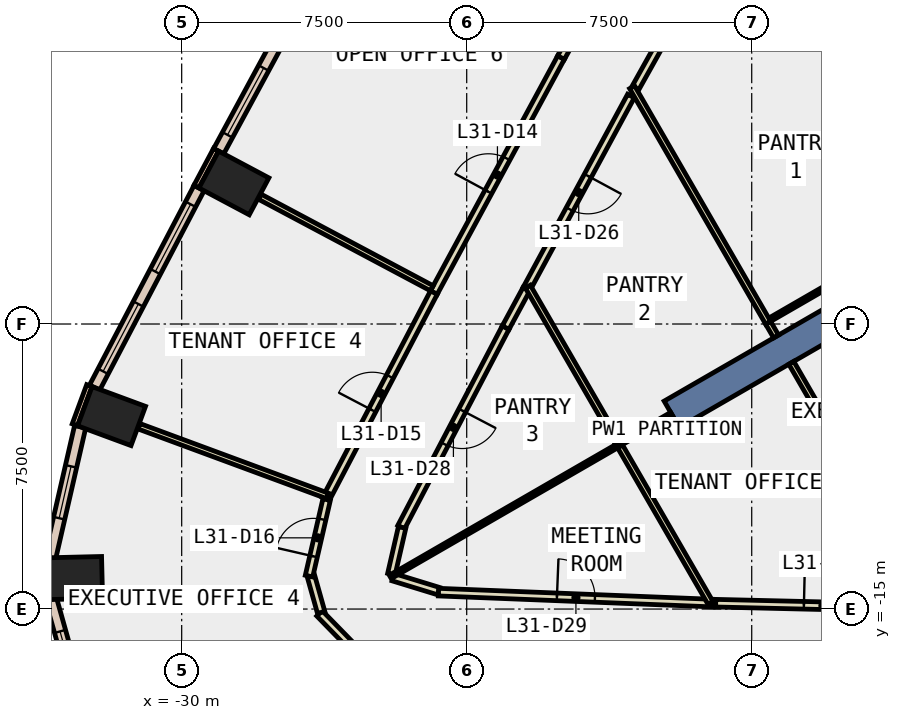
"""IFC4 building model, lengths in metres.
Left out: names, types, materials, properties, quantities, classifications, styles, units other than length and angle.
Written with IfcOpenShell. Run it as: python <this file> out.ifc"""

import sys

from ifc_helpers import new_model, si_unit, direction, frame, frame_2d, origin, origin_2d, place, context, subcontext, project, spatial, polyline, rectangle, outline, extrude, element, fill, save


model = new_model("IFC4")
c1 = context("Model", 3, precision=1e-05, world=origin(), true_north=direction((0.0, 1.0)))
c2 = subcontext(c1, "Body", "Model", "MODEL_VIEW")
j1 = project(units=[si_unit("LENGTHUNIT", "METRE"), si_unit("PLANEANGLEUNIT", "RADIAN")], contexts=[c1])
p1 = place(None, origin())
s1 = spatial("IfcSite", under=j1, at=p1, CompositionType="ELEMENT")
p2 = place(p1, origin())
s2 = spatial("IfcBuilding", under=s1, at=p2, CompositionType="ELEMENT")
p3 = place(p2, frame((0.0, 0.0, 142.4)))
s3 = spatial("IfcBuildingStorey", under=s2, at=p3, CompositionType="ELEMENT", Elevation=142.4)
for number, where, z_axis, x_axis in (
    (1, (-28.626, -3.788, -0.4), (0.0, 0.0, 1.0), (0.47, 0.883, 0.0)),
    (2, (-31.846, -9.923, -0.4), (0.0, 0.0, 1.0), (0.347, 0.938, 0.0)),
    (3, (-32.845, -14.185, -0.4), (0.0, 0.0, 1.0), (-0.024, 1.0, 0.0)),
):
    element("IfcColumn", number, at=place(p3, frame(where, z_axis=z_axis, x_axis=x_axis)), inside=s3, PredefinedType="COLUMN", context=c2, shape_type="SweptSolid", body=[
        extrude(rectangle(XDim=1.1, YDim=1.5, at=origin_2d()), origin(), (0.0, 0.0, 1.0), 4.2),
    ])
p4 = place(p3, frame((0.0, 0.0, -0.4)))
e4 = element("IfcWall", 4, at=p4, inside=s3, PredefinedType="SHEAR", context=c2, shape_type="SweptSolid", body=[
    extrude(outline(polyline([(-13.856, 2.5), (-6.928, -9.5), (-6.466, -8.7), (-12.933, 2.5), (-13.856, 2.5)])), origin(), (0.0, 0.0, 1.0), 4.2),
])
p5 = place(p3, frame((-9.31, -5.375, -0.4), z_axis=(0.0, 0.0, 1.0), x_axis=(-0.866017533419, -0.500013631625, 0.0)))
e5 = element("IfcWall", 5, at=p5, inside=s3, PredefinedType="SHEAR", context=c2, shape_type="SweptSolid", body=[
    extrude(rectangle(XDim=9.0, YDim=0.8, at=frame_2d((4.5, 0.0))), origin(), (0.0, 0.0, 1.0), 4.2),
])
for number, where, z_axis, x_axis in (
    (6, (-29.095, -2.915, 0.0), (0.0, 0.0, 1.0), (-0.47, -0.883, 0.0)),
    (7, (-32.429, -9.121, 0.0), (0.0, 0.0, 1.0), (-0.346, -0.938, 0.0)),
):
    element("IfcWall", number, at=place(p3, frame(where, z_axis=z_axis, x_axis=x_axis)), inside=s3, PredefinedType="STANDARD", context=c2, shape_type="SweptSolid", body=[
        extrude(rectangle(XDim=1.1, YDim=0.15, at=frame_2d((0.55, 0.0))), origin(), (0.0, 0.0, 1.0), 3.8),
    ])
p6 = place(p3, frame((-26.194, 2.282, 0.0), z_axis=(0.0, 0.0, 1.0), x_axis=(-0.475794135288, -0.87955667289, 0.0)))
e8 = element("IfcWall", 8, at=p6, inside=s3, PredefinedType="STANDARD", context=c2, shape_type="SweptSolid", body=[
    extrude(rectangle(XDim=5.952, YDim=0.3, at=frame_2d((2.976, 0.0))), origin(), (0.0, 0.0, 1.0), 3.8),
])
p7 = place(p6, frame((0.488, 0.0, 0.9)))
e9 = element("IfcOpeningElement", 9, at=p7, cuts=e8, PredefinedType="OPENING", context=c2, shape_type="SweptSolid", body=[
    extrude(rectangle(XDim=2.0, YDim=2.6, at=frame_2d((1.0, 1.3))), frame((0.0, 0.16, 0.0), z_axis=(0.0, -1.0, 0.0), x_axis=(1.0, 0.0, 0.0)), (0.0, 0.0, 1.0), 0.32),
])
p8 = place(p6, frame((3.464, 0.0, 0.9)))
e10 = element("IfcOpeningElement", 10, at=p8, cuts=e8, PredefinedType="OPENING", context=c2, shape_type="SweptSolid", body=[
    extrude(rectangle(XDim=2.0, YDim=2.6, at=frame_2d((1.0, 1.3))), frame((0.0, 0.16, 0.0), z_axis=(0.0, -1.0, 0.0), x_axis=(1.0, 0.0, 0.0)), (0.0, 0.0, 1.0), 0.32),
])
p9 = place(p3, frame((-29.542, -3.922, 0.0), z_axis=(0.0, 0.0, 1.0), x_axis=(-0.463809970306, -0.885934710599, 0.0)))
e11 = element("IfcWall", 11, at=p9, inside=s3, PredefinedType="STANDARD", context=c2, shape_type="SweptSolid", body=[
    extrude(rectangle(XDim=5.927, YDim=0.3, at=frame_2d((2.963, 0.0))), origin(), (0.0, 0.0, 1.0), 3.8),
])
p10 = place(p9, frame((0.482, 0.0, 0.9)))
e12 = element("IfcOpeningElement", 12, at=p10, cuts=e11, PredefinedType="OPENING", context=c2, shape_type="SweptSolid", body=[
    extrude(rectangle(XDim=2.0, YDim=2.6, at=frame_2d((1.0, 1.3))), frame((0.0, 0.16, 0.0), z_axis=(0.0, -1.0, 0.0), x_axis=(1.0, 0.0, 0.0)), (0.0, 0.0, 1.0), 0.32),
])
p11 = place(p9, frame((3.445, 0.0, 0.9)))
e13 = element("IfcOpeningElement", 13, at=p11, cuts=e11, PredefinedType="OPENING", context=c2, shape_type="SweptSolid", body=[
    extrude(rectangle(XDim=2.0, YDim=2.6, at=frame_2d((1.0, 1.3))), frame((0.0, 0.16, 0.0), z_axis=(0.0, -1.0, 0.0), x_axis=(1.0, 0.0, 0.0)), (0.0, 0.0, 1.0), 0.32),
])
p12 = place(p3, frame((-32.672, -10.203, 0.0), z_axis=(0.0, 0.0, 1.0), x_axis=(-0.223538714932, -0.974695051247, 0.0)))
e14 = element("IfcWall", 14, at=p12, inside=s3, PredefinedType="STANDARD", context=c2, shape_type="SweptSolid", body=[
    extrude(rectangle(XDim=3.538, YDim=0.3, at=frame_2d((1.769, 0.0))), origin(), (0.0, 0.0, 1.0), 3.8),
])
p13 = place(p12, frame((1.069, 0.0, 0.9)))
e15 = element("IfcOpeningElement", 15, at=p13, cuts=e14, PredefinedType="OPENING", context=c2, shape_type="SweptSolid", body=[
    extrude(rectangle(XDim=1.4, YDim=2.6, at=frame_2d((0.7, 1.3))), frame((0.0, 0.16, 0.0), z_axis=(0.0, -1.0, 0.0), x_axis=(1.0, 0.0, 0.0)), (0.0, 0.0, 1.0), 0.32),
])
p14 = place(p3, frame((-33.437, -14.749, 0.0), z_axis=(0.0, 0.0, 1.0), x_axis=(0.270471130801, -0.962728085912, 0.0)))
e16 = element("IfcWall", 16, at=p14, inside=s3, PredefinedType="STANDARD", context=c2, shape_type="SweptSolid", body=[
    extrude(rectangle(XDim=3.143, YDim=0.3, at=frame_2d((1.572, 0.0))), origin(), (0.0, 0.0, 1.0), 3.8),
])
p15 = place(p14, frame((0.872, 0.0, 0.9)))
e17 = element("IfcOpeningElement", 17, at=p15, cuts=e16, PredefinedType="OPENING", context=c2, shape_type="SweptSolid", body=[
    extrude(rectangle(XDim=1.4, YDim=2.6, at=frame_2d((0.7, 1.3))), frame((0.0, 0.16, 0.0), z_axis=(0.0, -1.0, 0.0), x_axis=(1.0, 0.0, 0.0)), (0.0, 0.0, 1.0), 0.32),
])
p16 = place(p3, frame((-14.955, 4.264, 0.0), z_axis=(0.0, 0.0, 1.0), x_axis=(-0.4879770011, -0.872856486713, 0.0)))
e18 = element("IfcWall", 18, at=p16, inside=s3, PredefinedType="PARTITIONING", context=c2, shape_type="SweptSolid", body=[
    extrude(rectangle(XDim=6.363, YDim=0.2, at=frame_2d((3.182, 0.0))), origin(), (0.0, 0.0, 1.0), 3.8),
])
p17 = place(p16, frame((2.681, 0.0, 0.0)))
e19 = element("IfcOpeningElement", 19, at=p17, cuts=e18, PredefinedType="OPENING", context=c2, shape_type="SweptSolid", body=[
    extrude(rectangle(XDim=1.0, YDim=2.1, at=frame_2d((0.5, 1.05))), frame((0.0, 0.11, 0.0), z_axis=(0.0, -1.0, 0.0), x_axis=(1.0, 0.0, 0.0)), (0.0, 0.0, 1.0), 0.22),
])
p18 = place(p3, frame((-18.178, -1.501, 0.0), z_axis=(0.0, 0.0, 1.0), x_axis=(-0.475923642768, -0.879486603795, 0.0)))
e20 = element("IfcWall", 20, at=p18, inside=s3, PredefinedType="PARTITIONING", context=c2, shape_type="SweptSolid", body=[
    extrude(rectangle(XDim=5.776, YDim=0.2, at=frame_2d((2.888, 0.0))), origin(), (0.0, 0.0, 1.0), 3.8),
])
p19 = place(p18, frame((2.388, 0.0, 0.0)))
e21 = element("IfcOpeningElement", 21, at=p19, cuts=e20, PredefinedType="OPENING", context=c2, shape_type="SweptSolid", body=[
    extrude(rectangle(XDim=1.0, YDim=2.1, at=frame_2d((0.5, 1.05))), frame((0.0, 0.11, 0.0), z_axis=(0.0, -1.0, 0.0), x_axis=(1.0, 0.0, 0.0)), (0.0, 0.0, 1.0), 0.22),
])
p20 = place(p3, frame((-15.948, -14.846, 0.0), z_axis=(0.0, 0.0, 1.0), x_axis=(0.999722136341, -0.023572231734, 0.0)))
e22 = element("IfcWall", 22, at=p20, inside=s3, PredefinedType="PARTITIONING", context=c2, shape_type="SweptSolid", body=[
    extrude(rectangle(XDim=5.645, YDim=0.2, at=frame_2d((2.822, 0.0))), origin(), (0.0, 0.0, 1.0), 3.8),
])
p21 = place(p20, frame((2.322, 0.0, 0.0)))
e23 = element("IfcOpeningElement", 23, at=p21, cuts=e22, PredefinedType="OPENING", context=c2, shape_type="SweptSolid", body=[
    extrude(rectangle(XDim=1.0, YDim=2.1, at=frame_2d((0.5, 1.05))), frame((0.0, 0.11, 0.0), z_axis=(0.0, -1.0, 0.0), x_axis=(1.0, 0.0, 0.0)), (0.0, 0.0, 1.0), 0.22),
])
p22 = place(p3, frame((-21.475, -7.594, 0.0), z_axis=(0.0, 0.0, 1.0), x_axis=(-0.463809970306, -0.885934710599, 0.0)))
e24 = element("IfcWall", 24, at=p22, inside=s3, PredefinedType="PARTITIONING", context=c2, shape_type="SweptSolid", body=[
    extrude(rectangle(XDim=5.927, YDim=0.2, at=frame_2d((2.963, 0.0))), origin(), (0.0, 0.0, 1.0), 3.8),
])
p23 = place(p22, frame((2.464, 0.0, 0.0)))
e25 = element("IfcOpeningElement", 25, at=p23, cuts=e24, PredefinedType="OPENING", context=c2, shape_type="SweptSolid", body=[
    extrude(rectangle(XDim=1.0, YDim=2.1, at=frame_2d((0.5, 1.05))), frame((0.0, 0.11, 0.0), z_axis=(0.0, -1.0, 0.0), x_axis=(1.0, 0.0, 0.0)), (0.0, 0.0, 1.0), 0.22),
])
p24 = place(p3, frame((-24.2, -12.854, 0.0), z_axis=(0.0, 0.0, 1.0), x_axis=(-0.223967203961, -0.974596681479, 0.0)))
e26 = element("IfcWall", 26, at=p24, inside=s3, PredefinedType="PARTITIONING", context=c2, shape_type="SweptSolid", body=[
    extrude(rectangle(XDim=1.259, YDim=0.2, at=frame_2d((0.629, 0.0))), origin(), (0.0, 0.0, 1.0), 3.8),
])
p25 = place(p3, frame((-20.927, -6.581, 0.0), z_axis=(0.0, 0.0, 1.0), x_axis=(-0.475893856394, -0.879502721682, 0.0)))
e27 = element("IfcWall", 27, at=p25, inside=s3, PredefinedType="PARTITIONING", context=c2, shape_type="SweptSolid", body=[
    extrude(rectangle(XDim=1.152, YDim=0.2, at=frame_2d((0.576, 0.0))), origin(), (0.0, 0.0, 1.0), 3.8),
])
p26 = place(p3, frame((-24.435, -14.162, 0.0), z_axis=(0.0, 0.0, 1.0), x_axis=(0.956086269468, -0.293085389152, 0.0)))
e28 = element("IfcWall", 28, at=p26, inside=s3, PredefinedType="PARTITIONING", context=c2, shape_type="SweptSolid", body=[
    extrude(rectangle(XDim=1.252, YDim=0.2, at=frame_2d((0.626, 0.0))), origin(), (0.0, 0.0, 1.0), 3.8),
])
p27 = place(p3, frame((-23.242, -14.555, 0.0), z_axis=(0.0, 0.0, 1.0), x_axis=(0.999202143743, -0.039938401802, 0.0)))
e29 = element("IfcWall", 29, at=p27, inside=s3, PredefinedType="PARTITIONING", context=c2, shape_type="SweptSolid", body=[
    extrude(rectangle(XDim=7.238, YDim=0.2, at=frame_2d((3.619, 0.0))), origin(), (0.0, 0.0, 1.0), 3.8),
])
p28 = place(p27, frame((3.119, 0.0, 0.0)))
e30 = element("IfcOpeningElement", 30, at=p28, cuts=e29, PredefinedType="OPENING", context=c2, shape_type="SweptSolid", body=[
    extrude(rectangle(XDim=1.0, YDim=2.1, at=frame_2d((0.5, 1.05))), frame((0.0, 0.11, 0.0), z_axis=(0.0, -1.0, 0.0), x_axis=(1.0, 0.0, 0.0)), (0.0, 0.0, 1.0), 0.22),
])
p29 = place(p3, frame((-23.365, -6.673, 0.0), z_axis=(0.0, 0.0, 1.0), x_axis=(0.47597665142, 0.879457916732, 0.0)))
e31 = element("IfcWall", 31, at=p29, inside=s3, PredefinedType="PARTITIONING", context=c2, shape_type="SweptSolid", body=[
    extrude(rectangle(XDim=7.032, YDim=0.2, at=frame_2d((3.516, 0.0))), origin(), (0.0, 0.0, 1.0), 3.8),
])
p30 = place(p29, frame((3.016, 0.0, 0.0)))
e32 = element("IfcOpeningElement", 32, at=p30, cuts=e31, PredefinedType="OPENING", context=c2, shape_type="SweptSolid", body=[
    extrude(rectangle(XDim=1.0, YDim=2.1, at=frame_2d((0.5, 1.05))), frame((0.0, 0.11, 0.0), z_axis=(0.0, -1.0, 0.0), x_axis=(1.0, 0.0, 0.0)), (0.0, 0.0, 1.0), 0.22),
])
p31 = place(p3, frame((-20.018, -0.489, 0.0), z_axis=(0.0, 0.0, 1.0), x_axis=(0.48792588674, 0.872885060617, 0.0)))
e33 = element("IfcWall", 33, at=p31, inside=s3, PredefinedType="PARTITIONING", context=c2, shape_type="SweptSolid", body=[
    extrude(rectangle(XDim=3.403, YDim=0.2, at=frame_2d((1.701, 0.0))), origin(), (0.0, 0.0, 1.0), 3.8),
])
p32 = place(p3, frame((-26.21, -12.111, 0.0), z_axis=(0.0, 0.0, 1.0), x_axis=(0.46374980173, 0.885966207818, 0.0)))
e34 = element("IfcWall", 34, at=p32, inside=s3, PredefinedType="PARTITIONING", context=c2, shape_type="SweptSolid", body=[
    extrude(rectangle(XDim=6.137, YDim=0.2, at=frame_2d((3.068, 0.0))), origin(), (0.0, 0.0, 1.0), 3.8),
])
p33 = place(p32, frame((2.644, 0.0, 0.0)))
e35 = element("IfcOpeningElement", 35, at=p33, cuts=e34, PredefinedType="OPENING", context=c2, shape_type="SweptSolid", body=[
    extrude(rectangle(XDim=1.0, YDim=2.1, at=frame_2d((0.5, 1.05))), frame((0.0, 0.11, 0.0), z_axis=(0.0, -1.0, 0.0), x_axis=(1.0, 0.0, 0.0)), (0.0, 0.0, 1.0), 0.22),
])
p34 = place(p3, frame((-25.538, -15.97, 0.0), z_axis=(0.0, 0.0, 1.0), x_axis=(-0.698272822523, 0.715831729756, 0.0)))
e36 = element("IfcWall", 36, at=p34, inside=s3, PredefinedType="PARTITIONING", context=c2, shape_type="SweptSolid", body=[
    extrude(rectangle(XDim=1.196, YDim=0.2, at=frame_2d((0.598, 0.0))), origin(), (0.0, 0.0, 1.0), 3.8),
])
p35 = place(p3, frame((-26.33, -15.089, 0.0), z_axis=(0.0, 0.0, 1.0), x_axis=(-0.270631784819, 0.962682936925, 0.0)))
e37 = element("IfcWall", 37, at=p35, inside=s3, PredefinedType="PARTITIONING", context=c2, shape_type="SweptSolid", body=[
    extrude(rectangle(XDim=0.994, YDim=0.2, at=frame_2d((0.497, 0.0))), origin(), (0.0, 0.0, 1.0), 3.8),
])
p36 = place(p3, frame((-26.649, -14.133, 0.0), z_axis=(0.0, 0.0, 1.0), x_axis=(0.224108401048, 0.974564222912, 0.0)))
e38 = element("IfcWall", 38, at=p36, inside=s3, PredefinedType="PARTITIONING", context=c2, shape_type="SweptSolid", body=[
    extrude(rectangle(XDim=2.065, YDim=0.2, at=frame_2d((1.033, 0.0))), origin(), (0.0, 0.0, 1.0), 3.8),
])
p37 = place(p36, frame((0.533, 0.0, 0.0)))
e39 = element("IfcOpeningElement", 39, at=p37, cuts=e38, PredefinedType="OPENING", context=c2, shape_type="SweptSolid", body=[
    extrude(rectangle(XDim=1.0, YDim=2.1, at=frame_2d((0.5, 1.05))), frame((0.0, 0.11, 0.0), z_axis=(0.0, -1.0, 0.0), x_axis=(1.0, 0.0, 0.0)), (0.0, 0.0, 1.0), 0.22),
])
p38 = place(p3, frame((-10.305, -4.951, 0.0), z_axis=(0.0, 0.0, 1.0), x_axis=(-0.866031185235, -0.4999899861, 0.0)))
e40 = element("IfcWall", 40, at=p38, inside=s3, PredefinedType="PARTITIONING", context=c2, shape_type="SweptSolid", body=[
    extrude(rectangle(XDim=4.95, YDim=0.1, at=frame_2d((2.475, 0.0))), origin(), (0.0, 0.0, 1.0), 3.8),
])
p39 = place(p3, frame((-14.567, -7.469, 0.0), z_axis=(0.0, 0.0, 1.0), x_axis=(-0.500056007527, 0.865993065409, 0.0)))
e41 = element("IfcWall", 41, at=p39, inside=s3, PredefinedType="PARTITIONING", context=c2, shape_type="SweptSolid", body=[
    extrude(rectangle(XDim=7.159, YDim=0.15, at=frame_2d((3.58, 0.0))), origin(), (0.0, 0.0, 1.0), 3.8),
])
p40 = place(p3, frame((-14.359, -7.828, 0.0), z_axis=(0.0, 0.0, 1.0), x_axis=(-0.501453821755, 0.865184410775, 0.0)))
e42 = element("IfcWall", 42, at=p40, inside=s3, PredefinedType="PARTITIONING", context=c2, shape_type="SweptSolid", body=[
    extrude(rectangle(XDim=0.415, YDim=0.15, at=frame_2d((0.208, 0.0))), origin(), (0.0, 0.0, 1.0), 3.8),
])
p41 = place(p3, frame((-10.18, -15.068, 0.0), z_axis=(0.0, 0.0, 1.0), x_axis=(-0.499907901386, 0.866078570415, 0.0)))
e43 = element("IfcWall", 43, at=p41, inside=s3, PredefinedType="PARTITIONING", context=c2, shape_type="SweptSolid", body=[
    extrude(rectangle(XDim=7.56, YDim=0.15, at=frame_2d((3.78, 0.0))), origin(), (0.0, 0.0, 1.0), 3.8),
])
p42 = place(p3, frame((-17.108, -9.869, 0.0), z_axis=(0.0, 0.0, 1.0), x_axis=(-0.866054481515, -0.499949632511, 0.0)))
e44 = element("IfcWall", 44, at=p42, inside=s3, PredefinedType="PARTITIONING", context=c2, shape_type="SweptSolid", body=[
    extrude(rectangle(XDim=1.675, YDim=0.1, at=frame_2d((0.837, 0.0))), origin(), (0.0, 0.0, 1.0), 3.8),
])
p43 = place(p3, frame((-18.518, -10.625, 0.0), z_axis=(0.0, 0.0, 1.0), x_axis=(-0.50001189137, 0.86601853819, 0.0)))
e45 = element("IfcWall", 45, at=p43, inside=s3, PredefinedType="PARTITIONING", context=c2, shape_type="SweptSolid", body=[
    extrude(rectangle(XDim=4.746, YDim=0.15, at=frame_2d((2.373, 0.0))), origin(), (0.0, 0.0, 1.0), 3.8),
])
p44 = place(p3, frame((-16.084, -14.841, 0.0), z_axis=(0.0, 0.0, 1.0), x_axis=(-0.50002451059, 0.866011252126, 0.0)))
e46 = element("IfcWall", 46, at=p44, inside=s3, PredefinedType="PARTITIONING", context=c2, shape_type="SweptSolid", body=[
    extrude(rectangle(XDim=4.758, YDim=0.15, at=frame_2d((2.379, 0.0))), origin(), (0.0, 0.0, 1.0), 3.8),
])
p45 = place(p3, frame((-18.553, -10.715, 0.0), z_axis=(0.0, 0.0, 1.0), x_axis=(-0.865984622623, -0.500070628392, 0.0)))
e47 = element("IfcWall", 47, at=p45, inside=s3, PredefinedType="PARTITIONING", context=c2, shape_type="SweptSolid", body=[
    extrude(rectangle(XDim=6.879, YDim=0.1, at=frame_2d((3.439, 0.0))), origin(), (0.0, 0.0, 1.0), 3.8),
])
p46 = place(p3, frame((-23.417, -6.56, 0.0), z_axis=(0.0, 0.0, 1.0), x_axis=(-0.882784638588, 0.469777906967, 0.0)))
e48 = element("IfcWall", 48, at=p46, inside=s3, PredefinedType="PARTITIONING", context=c2, shape_type="SweptSolid", body=[
    extrude(rectangle(XDim=5.13, YDim=0.15, at=frame_2d((2.565, 0.0))), origin(), (0.0, 0.0, 1.0), 3.8),
])
p47 = place(p3, frame((-26.164, -12.023, 0.0), z_axis=(0.0, 0.0, 1.0), x_axis=(-0.937995804261, 0.346646608505, 0.0)))
e49 = element("IfcWall", 49, at=p47, inside=s3, PredefinedType="PARTITIONING", context=c2, shape_type="SweptSolid", body=[
    extrude(rectangle(XDim=5.288, YDim=0.15, at=frame_2d((2.644, 0.0))), origin(), (0.0, 0.0, 1.0), 3.8),
])
p48 = place(p8, origin())
e50 = element("IfcWindow", 50, at=p48, inside=s3, PartitioningType="SINGLE_PANEL", PredefinedType="WINDOW", context=c2, shape_type="SweptSolid", body=[
    extrude(rectangle(XDim=2.0, YDim=2.6, at=frame_2d((1.0, 1.3))), frame((0.0, 0.03, 0.0), z_axis=(0.0, -1.0, 0.0), x_axis=(1.0, 0.0, 0.0)), (0.0, 0.0, 1.0), 0.06),
])
fill(e10, e50)
p49 = place(p10, origin())
e51 = element("IfcWindow", 51, at=p49, inside=s3, PartitioningType="SINGLE_PANEL", PredefinedType="WINDOW", context=c2, shape_type="SweptSolid", body=[
    extrude(rectangle(XDim=2.0, YDim=2.6, at=frame_2d((1.0, 1.3))), frame((0.0, 0.03, 0.0), z_axis=(0.0, -1.0, 0.0), x_axis=(1.0, 0.0, 0.0)), (0.0, 0.0, 1.0), 0.06),
])
fill(e12, e51)
p50 = place(p11, origin())
e52 = element("IfcWindow", 52, at=p50, inside=s3, PartitioningType="SINGLE_PANEL", PredefinedType="WINDOW", context=c2, shape_type="SweptSolid", body=[
    extrude(rectangle(XDim=2.0, YDim=2.6, at=frame_2d((1.0, 1.3))), frame((0.0, 0.03, 0.0), z_axis=(0.0, -1.0, 0.0), x_axis=(1.0, 0.0, 0.0)), (0.0, 0.0, 1.0), 0.06),
])
fill(e13, e52)
p51 = place(p13, origin())
e53 = element("IfcWindow", 53, at=p51, inside=s3, PartitioningType="SINGLE_PANEL", PredefinedType="WINDOW", context=c2, shape_type="SweptSolid", body=[
    extrude(rectangle(XDim=1.4, YDim=2.6, at=frame_2d((0.7, 1.3))), frame((0.0, 0.03, 0.0), z_axis=(0.0, -1.0, 0.0), x_axis=(1.0, 0.0, 0.0)), (0.0, 0.0, 1.0), 0.06),
])
fill(e15, e53)
p52 = place(p15, origin())
e54 = element("IfcWindow", 54, at=p52, inside=s3, PartitioningType="SINGLE_PANEL", PredefinedType="WINDOW", context=c2, shape_type="SweptSolid", body=[
    extrude(rectangle(XDim=1.4, YDim=2.6, at=frame_2d((0.7, 1.3))), frame((0.0, 0.03, 0.0), z_axis=(0.0, -1.0, 0.0), x_axis=(1.0, 0.0, 0.0)), (0.0, 0.0, 1.0), 0.06),
])
fill(e17, e54)
p53 = place(p30, origin())
e55 = element("IfcDoor", 55, at=p53, inside=s3, OperationType="SINGLE_SWING_LEFT", PredefinedType="DOOR", context=c2, shape_type="SweptSolid", body=[
    extrude(rectangle(XDim=1.0, YDim=2.1, at=frame_2d((0.5, 1.05))), frame((0.0, 0.025, 0.0), z_axis=(0.0, -1.0, 0.0), x_axis=(1.0, 0.0, 0.0)), (0.0, 0.0, 1.0), 0.05),
])
fill(e32, e55)
p54 = place(p33, origin())
e56 = element("IfcDoor", 56, at=p54, inside=s3, OperationType="SINGLE_SWING_LEFT", PredefinedType="DOOR", context=c2, shape_type="SweptSolid", body=[
    extrude(rectangle(XDim=1.0, YDim=2.1, at=frame_2d((0.5, 1.05))), frame((0.0, 0.025, 0.0), z_axis=(0.0, -1.0, 0.0), x_axis=(1.0, 0.0, 0.0)), (0.0, 0.0, 1.0), 0.05),
])
fill(e35, e56)
p55 = place(p37, origin())
e57 = element("IfcDoor", 57, at=p55, inside=s3, OperationType="SINGLE_SWING_LEFT", PredefinedType="DOOR", context=c2, shape_type="SweptSolid", body=[
    extrude(rectangle(XDim=1.0, YDim=2.1, at=frame_2d((0.5, 1.05))), frame((0.0, 0.025, 0.0), z_axis=(0.0, -1.0, 0.0), x_axis=(1.0, 0.0, 0.0)), (0.0, 0.0, 1.0), 0.05),
])
fill(e39, e57)
p56 = place(p19, origin())
e58 = element("IfcDoor", 58, at=p56, inside=s3, OperationType="SINGLE_SWING_LEFT", PredefinedType="DOOR", context=c2, shape_type="SweptSolid", body=[
    extrude(rectangle(XDim=1.0, YDim=2.1, at=frame_2d((0.5, 1.05))), frame((0.0, 0.025, 0.0), z_axis=(0.0, -1.0, 0.0), x_axis=(1.0, 0.0, 0.0)), (0.0, 0.0, 1.0), 0.05),
])
fill(e21, e58)
p57 = place(p21, origin())
e59 = element("IfcDoor", 59, at=p57, inside=s3, OperationType="SINGLE_SWING_LEFT", PredefinedType="DOOR", context=c2, shape_type="SweptSolid", body=[
    extrude(rectangle(XDim=1.0, YDim=2.1, at=frame_2d((0.5, 1.05))), frame((0.0, 0.025, 0.0), z_axis=(0.0, -1.0, 0.0), x_axis=(1.0, 0.0, 0.0)), (0.0, 0.0, 1.0), 0.05),
])
fill(e23, e59)
p58 = place(p23, origin())
e60 = element("IfcDoor", 60, at=p58, inside=s3, OperationType="SINGLE_SWING_LEFT", PredefinedType="DOOR", context=c2, shape_type="SweptSolid", body=[
    extrude(rectangle(XDim=1.0, YDim=2.1, at=frame_2d((0.5, 1.05))), frame((0.0, 0.025, 0.0), z_axis=(0.0, -1.0, 0.0), x_axis=(1.0, 0.0, 0.0)), (0.0, 0.0, 1.0), 0.05),
])
fill(e25, e60)
p59 = place(p28, origin())
e61 = element("IfcDoor", 61, at=p59, inside=s3, OperationType="SINGLE_SWING_LEFT", PredefinedType="DOOR", context=c2, shape_type="SweptSolid", body=[
    extrude(rectangle(XDim=1.0, YDim=2.1, at=frame_2d((0.5, 1.05))), frame((0.0, 0.025, 0.0), z_axis=(0.0, -1.0, 0.0), x_axis=(1.0, 0.0, 0.0)), (0.0, 0.0, 1.0), 0.05),
])
fill(e30, e61)
save(model, sys.argv[1])
